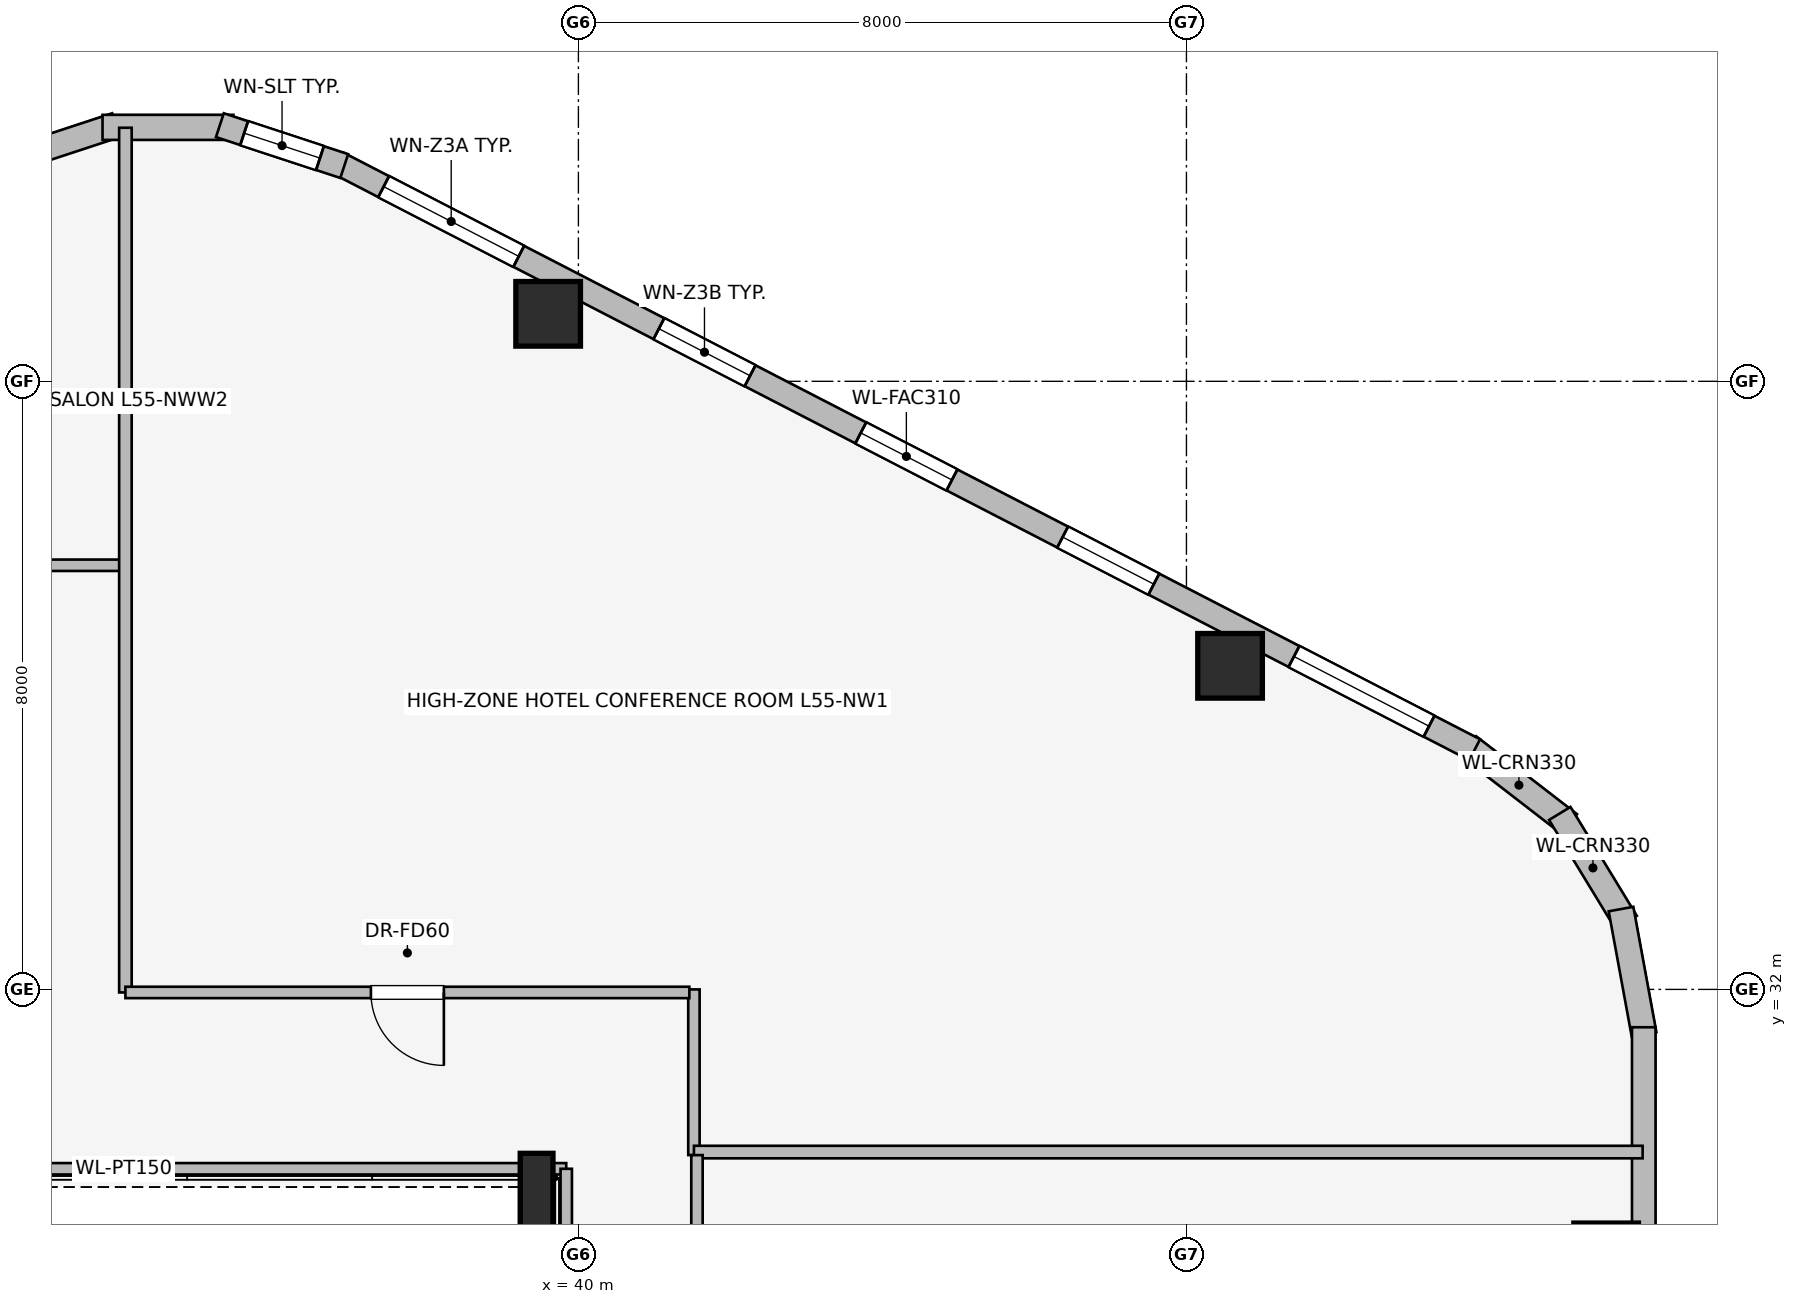
"""IFC4 building model, lengths in metres.
Left out: names, types, materials, properties, quantities, classifications, styles, units other than length and angle.
Written with IfcOpenShell. Run it as: python <this file> out.ifc"""

import sys

from ifc_helpers import new_model, si_unit, direction, frame, frame_2d, origin, origin_2d, place, context, subcontext, project, spatial, rectangle, i_section, extrude, element, fill, save


model = new_model("IFC4")
c1 = context("Model", 3, precision=1e-05, world=origin(), true_north=direction((0.0, 1.0)))
c2 = subcontext(c1, "Body", "Model", "MODEL_VIEW")
j1 = project(units=[si_unit("LENGTHUNIT", "METRE"), si_unit("PLANEANGLEUNIT", "RADIAN")], contexts=[c1])
p1 = place(None, origin())
s1 = spatial("IfcSite", under=j1, at=p1, CompositionType="ELEMENT")
p2 = place(p1, origin())
s2 = spatial("IfcBuilding", under=s1, at=p2, CompositionType="ELEMENT")
p3 = place(p2, frame((0.0, 0.0, 203.35)))
s3 = spatial("IfcBuildingStorey", under=s2, at=p3, CompositionType="ELEMENT", Elevation=203.35)
for number, where, z_axis, x_axis in (
    (1, (48.574, 36.257, 0.0), (0.0, 0.0, 1.0), (1.0, 0.0, 0.0)),
    (2, (39.602, 40.888, 0.0), (0.0, 0.0, 1.0), (1.0, 0.0, 0.0)),
    (3, (53.522, 28.501, 0.0), (0.0, 0.0, 1.0), (1.0, 0.0, 0.0)),
):
    element("IfcColumn", number, at=place(p3, frame(where, z_axis=z_axis, x_axis=x_axis)), inside=s3, PredefinedType="COLUMN", context=c2, shape_type="SweptSolid", body=[
        extrude(rectangle(XDim=0.85, YDim=0.85, at=origin_2d()), origin(), (0.0, 0.0, 1.0), 3.45),
    ])
p4 = place(p3, frame((39.45, 29.35, 0.0), z_axis=(0.0, 0.0, 1.0), x_axis=(1.0, 0.0, 0.0)))
e4 = element("IfcColumn", 4, at=p4, inside=s3, PredefinedType="COLUMN", context=c2, shape_type="SweptSolid", body=[
    extrude(i_section(OverallWidth=0.431, OverallDepth=0.987, WebThickness=0.034, FlangeThickness=0.062, at=origin_2d()), origin(), (0.0, 0.0, 1.0), 3.45),
])
p5 = place(p3, frame((51.711, 35.2, 0.0), z_axis=(0.0, 0.0, 1.0), x_axis=(0.791464279355, -0.611215423976, 0.0)))
e5 = element("IfcWall", 5, at=p5, inside=s3, PredefinedType="STANDARD", context=c2, shape_type="SweptSolid", body=[
    extrude(rectangle(XDim=1.677, YDim=0.33, at=frame_2d((0.838, 0.0))), origin(), (0.0, 0.0, 1.0), 3.19),
])
p6 = place(p3, frame((52.912, 34.315, 0.0), z_axis=(0.0, 0.0, 1.0), x_axis=(0.520219286058, -0.85403272444, 0.0)))
e6 = element("IfcWall", 6, at=p6, inside=s3, PredefinedType="STANDARD", context=c2, shape_type="SweptSolid", body=[
    extrude(rectangle(XDim=1.678, YDim=0.33, at=frame_2d((0.839, 0.0))), origin(), (0.0, 0.0, 1.0), 3.19),
])
p7 = place(p3, frame((53.718, 33.057, 0.0), z_axis=(0.0, 0.0, 1.0), x_axis=(0.180717642671, -0.983535019014, 0.0)))
e7 = element("IfcWall", 7, at=p7, inside=s3, PredefinedType="STANDARD", context=c2, shape_type="SweptSolid", body=[
    extrude(rectangle(XDim=1.677, YDim=0.33, at=frame_2d((0.838, 0.0))), origin(), (0.0, 0.0, 1.0), 3.19),
])
p8 = place(p3, frame((36.838, 42.871, 0.0), z_axis=(0.0, 0.0, 1.0), x_axis=(0.888626188278, -0.458632202867, 0.0)))
e8 = element("IfcWall", 8, at=p8, inside=s3, PredefinedType="STANDARD", context=c2, shape_type="SweptSolid", body=[
    extrude(rectangle(XDim=16.828, YDim=0.31, at=frame_2d((8.414, 0.0))), origin(), (0.0, 0.0, 1.0), 3.19),
])
p9 = place(p8, frame((0.675, 0.0, 0.75)))
e9 = element("IfcOpeningElement", 9, at=p9, cuts=e8, PredefinedType="OPENING", context=c2, shape_type="SweptSolid", body=[
    extrude(rectangle(XDim=2.0, YDim=1.5, at=frame_2d((1.0, 0.75))), frame((0.0, 0.165, 0.0), z_axis=(0.0, -1.0, 0.0), x_axis=(1.0, 0.0, 0.0)), (0.0, 0.0, 1.0), 0.33),
])
p10 = place(p8, frame((4.75, 0.0, 0.75)))
e10 = element("IfcOpeningElement", 10, at=p10, cuts=e8, PredefinedType="OPENING", context=c2, shape_type="SweptSolid", body=[
    extrude(rectangle(XDim=1.35, YDim=1.45, at=frame_2d((0.675, 0.725))), frame((0.0, 0.165, 0.0), z_axis=(0.0, -1.0, 0.0), x_axis=(1.0, 0.0, 0.0)), (0.0, 0.0, 1.0), 0.33),
])
p11 = place(p8, frame((7.739, 0.0, 0.75)))
e11 = element("IfcOpeningElement", 11, at=p11, cuts=e8, PredefinedType="OPENING", context=c2, shape_type="SweptSolid", body=[
    extrude(rectangle(XDim=1.35, YDim=1.45, at=frame_2d((0.675, 0.725))), frame((0.0, 0.165, 0.0), z_axis=(0.0, -1.0, 0.0), x_axis=(1.0, 0.0, 0.0)), (0.0, 0.0, 1.0), 0.33),
])
p12 = place(p8, frame((10.728, 0.0, 0.75)))
e12 = element("IfcOpeningElement", 12, at=p12, cuts=e8, PredefinedType="OPENING", context=c2, shape_type="SweptSolid", body=[
    extrude(rectangle(XDim=1.35, YDim=1.45, at=frame_2d((0.675, 0.725))), frame((0.0, 0.165, 0.0), z_axis=(0.0, -1.0, 0.0), x_axis=(1.0, 0.0, 0.0)), (0.0, 0.0, 1.0), 0.33),
])
p13 = place(p8, frame((14.153, 0.0, 0.75)))
e13 = element("IfcOpeningElement", 13, at=p13, cuts=e8, PredefinedType="OPENING", context=c2, shape_type="SweptSolid", body=[
    extrude(rectangle(XDim=2.0, YDim=1.5, at=frame_2d((1.0, 0.75))), frame((0.0, 0.165, 0.0), z_axis=(0.0, -1.0, 0.0), x_axis=(1.0, 0.0, 0.0)), (0.0, 0.0, 1.0), 0.33),
])
p14 = place(p3, frame((32.281, 42.832, 0.0), z_axis=(0.0, 0.0, 1.0), x_axis=(0.949937416267, 0.312440242569, 0.0)))
e14 = element("IfcWall", 14, at=p14, inside=s3, PredefinedType="STANDARD", context=c2, shape_type="SweptSolid", body=[
    extrude(rectangle(XDim=1.722, YDim=0.33, at=frame_2d((0.861, 0.0))), origin(), (0.0, 0.0, 1.0), 3.19),
])
p15 = place(p3, frame((33.739, 43.341, 0.0), z_axis=(0.0, 0.0, 1.0), x_axis=(1.0, 0.0, 0.0)))
e15 = element("IfcWall", 15, at=p15, inside=s3, PredefinedType="STANDARD", context=c2, shape_type="SweptSolid", body=[
    extrude(rectangle(XDim=1.722, YDim=0.33, at=frame_2d((0.861, 0.0))), origin(), (0.0, 0.0, 1.0), 3.19),
])
p16 = place(p3, frame((35.283, 43.37, 0.0), z_axis=(0.0, 0.0, 1.0), x_axis=(0.949937416267, -0.312440242569, 0.0)))
e16 = element("IfcWall", 16, at=p16, inside=s3, PredefinedType="STANDARD", context=c2, shape_type="SweptSolid", body=[
    extrude(rectangle(XDim=1.722, YDim=0.33, at=frame_2d((0.861, 0.0))), origin(), (0.0, 0.0, 1.0), 3.19),
])
p17 = place(p16, frame((0.336, 0.0, 0.75)))
e17 = element("IfcOpeningElement", 17, at=p17, cuts=e16, PredefinedType="OPENING", context=c2, shape_type="SweptSolid", body=[
    extrude(rectangle(XDim=1.05, YDim=1.4, at=frame_2d((0.525, 0.7))), frame((0.0, 0.175, 0.0), z_axis=(0.0, -1.0, 0.0), x_axis=(1.0, 0.0, 0.0)), (0.0, 0.0, 1.0), 0.35),
])
p18 = place(p3, frame((54.017, 31.502, 0.0), z_axis=(0.0, 0.0, 1.0), x_axis=(0.0, -1.0, 0.0)))
e18 = element("IfcWall", 18, at=p18, inside=s3, PredefinedType="STANDARD", context=c2, shape_type="SweptSolid", body=[
    extrude(rectangle(XDim=15.004, YDim=0.31, at=frame_2d((7.502, 0.0))), origin(), (0.0, 0.0, 1.0), 3.19),
])
p19 = place(p18, frame((4.007, 0.0, 0.75)))
e19 = element("IfcOpeningElement", 19, at=p19, cuts=e18, PredefinedType="OPENING", context=c2, shape_type="SweptSolid", body=[
    extrude(rectangle(XDim=1.05, YDim=1.4, at=frame_2d((0.525, 0.7))), frame((0.0, 0.165, 0.0), z_axis=(0.0, -1.0, 0.0), x_axis=(1.0, 0.0, 0.0)), (0.0, 0.0, 1.0), 0.33),
])
p20 = place(p18, frame((6.833, 0.0, 0.75)))
e20 = element("IfcOpeningElement", 20, at=p20, cuts=e18, PredefinedType="OPENING", context=c2, shape_type="SweptSolid", body=[
    extrude(rectangle(XDim=1.35, YDim=1.45, at=frame_2d((0.675, 0.725))), frame((0.0, 0.165, 0.0), z_axis=(0.0, -1.0, 0.0), x_axis=(1.0, 0.0, 0.0)), (0.0, 0.0, 1.0), 0.33),
])
p21 = place(p18, frame((9.953, 0.0, 0.75)))
e21 = element("IfcOpeningElement", 21, at=p21, cuts=e18, PredefinedType="OPENING", context=c2, shape_type="SweptSolid", body=[
    extrude(rectangle(XDim=1.05, YDim=1.4, at=frame_2d((0.525, 0.7))), frame((0.0, 0.165, 0.0), z_axis=(0.0, -1.0, 0.0), x_axis=(1.0, 0.0, 0.0)), (0.0, 0.0, 1.0), 0.33),
])
p22 = place(p3, frame((39.84, 29.64, 0.0), z_axis=(0.0, 0.0, 1.0), x_axis=(-1.0, 0.0, 0.0)))
e22 = element("IfcWall", 22, at=p22, inside=s3, PredefinedType="PARTITIONING", context=c2, shape_type="SweptSolid", body=[
    extrude(rectangle(XDim=12.203, YDim=0.15, at=frame_2d((6.102, 0.0))), origin(), (0.0, 0.0, 1.0), 2.331),
])
p23 = place(p3, frame((39.84, 18.36, 0.0), z_axis=(0.0, 0.0, 1.0), x_axis=(0.0, 1.0, 0.0)))
e23 = element("IfcWall", 23, at=p23, inside=s3, PredefinedType="PARTITIONING", context=c2, shape_type="SweptSolid", body=[
    extrude(rectangle(XDim=11.28, YDim=0.15, at=frame_2d((5.64, 0.0))), origin(), (0.0, 0.0, 1.0), 3.19),
])
p24 = place(p3, frame((33.962, 37.58, 0.0), z_axis=(0.0, 0.0, 1.0), x_axis=(-1.0, 0.0, 0.0)))
e24 = element("IfcWall", 24, at=p24, inside=s3, PredefinedType="PARTITIONING", context=c2, shape_type="SweptSolid", body=[
    extrude(rectangle(XDim=5.836, YDim=0.15, at=frame_2d((2.918, 0.0))), origin(), (0.0, 0.0, 1.0), 2.582),
])
p25 = place(p24, frame((2.663, 0.0, 0.0)))
e25 = element("IfcOpeningElement", 25, at=p25, cuts=e24, PredefinedType="OPENING", context=c2, shape_type="SweptSolid", body=[
    extrude(rectangle(XDim=0.96, YDim=2.0, at=frame_2d((0.48, 1.0))), frame((0.0, 0.085, 0.0), z_axis=(0.0, -1.0, 0.0), x_axis=(1.0, 0.0, 0.0)), (0.0, 0.0, 1.0), 0.17),
])
p26 = place(p3, frame((34.04, 31.96, 0.0), z_axis=(0.0, 0.0, 1.0), x_axis=(0.0, 1.0, 0.0)))
e26 = element("IfcWall", 26, at=p26, inside=s3, PredefinedType="PARTITIONING", context=c2, shape_type="SweptSolid", body=[
    extrude(rectangle(XDim=11.376, YDim=0.165, at=frame_2d((5.688, 0.0))), origin(), (0.0, 0.0, 1.0), 3.19),
])
p27 = place(p3, frame((41.52, 29.82, 0.0), z_axis=(0.0, 0.0, 1.0), x_axis=(0.0, 1.0, 0.0)))
e27 = element("IfcWall", 27, at=p27, inside=s3, PredefinedType="PARTITIONING", context=c2, shape_type="SweptSolid", body=[
    extrude(rectangle(XDim=2.18, YDim=0.15, at=frame_2d((1.09, 0.0))), origin(), (0.0, 0.0, 1.0), 3.19),
])
p28 = place(p3, frame((41.46, 31.96, 0.0), z_axis=(0.0, 0.0, 1.0), x_axis=(-1.0, 0.0, 0.0)))
e28 = element("IfcWall", 28, at=p28, inside=s3, PredefinedType="PARTITIONING", context=c2, shape_type="SweptSolid", body=[
    extrude(rectangle(XDim=7.42, YDim=0.15, at=frame_2d((3.71, 0.0))), origin(), (0.0, 0.0, 1.0), 3.19),
])
p29 = place(p28, frame((3.23, 0.0, 0.0)))
e29 = element("IfcOpeningElement", 29, at=p29, cuts=e28, PredefinedType="OPENING", context=c2, shape_type="SweptSolid", body=[
    extrude(rectangle(XDim=0.96, YDim=2.0, at=frame_2d((0.48, 1.0))), frame((0.0, 0.085, 0.0), z_axis=(0.0, -1.0, 0.0), x_axis=(1.0, 0.0, 0.0)), (0.0, 0.0, 1.0), 0.17),
])
p30 = place(p3, frame((41.52, 29.86, 0.0), z_axis=(0.0, 0.0, 1.0), x_axis=(1.0, 0.0, 0.0)))
e30 = element("IfcWall", 30, at=p30, inside=s3, PredefinedType="PARTITIONING", context=c2, shape_type="SweptSolid", body=[
    extrude(rectangle(XDim=12.482, YDim=0.165, at=frame_2d((6.241, 0.0))), origin(), (0.0, 0.0, 1.0), 3.19),
])
p31 = place(p3, frame((41.56, 25.659, 0.0), z_axis=(0.0, 0.0, 1.0), x_axis=(0.0, 1.0, 0.0)))
e31 = element("IfcWall", 31, at=p31, inside=s3, PredefinedType="PARTITIONING", context=c2, shape_type="SweptSolid", body=[
    extrude(rectangle(XDim=4.161, YDim=0.15, at=frame_2d((2.081, 0.0))), origin(), (0.0, 0.0, 1.0), 3.19),
])
p32 = place(p31, frame((1.601, 0.0, 0.0)))
e32 = element("IfcOpeningElement", 32, at=p32, cuts=e31, PredefinedType="OPENING", context=c2, shape_type="SweptSolid", body=[
    extrude(rectangle(XDim=0.96, YDim=2.0, at=frame_2d((0.48, 1.0))), frame((0.0, 0.085, 0.0), z_axis=(0.0, -1.0, 0.0), x_axis=(1.0, 0.0, 0.0)), (0.0, 0.0, 1.0), 0.17),
])
p33 = place(p9, origin())
e33 = element("IfcWindow", 33, at=p33, inside=s3, PartitioningType="SINGLE_PANEL", PredefinedType="WINDOW", context=c2, shape_type="SweptSolid", body=[
    extrude(rectangle(XDim=2.0, YDim=1.5, at=frame_2d((1.0, 0.75))), frame((0.0, 0.03, 0.0), z_axis=(0.0, -1.0, 0.0), x_axis=(1.0, 0.0, 0.0)), (0.0, 0.0, 1.0), 0.06),
])
fill(e9, e33)
p34 = place(p10, origin())
e34 = element("IfcWindow", 34, at=p34, inside=s3, PartitioningType="SINGLE_PANEL", PredefinedType="WINDOW", context=c2, shape_type="SweptSolid", body=[
    extrude(rectangle(XDim=1.35, YDim=1.45, at=frame_2d((0.675, 0.725))), frame((0.0, 0.03, 0.0), z_axis=(0.0, -1.0, 0.0), x_axis=(1.0, 0.0, 0.0)), (0.0, 0.0, 1.0), 0.06),
])
fill(e10, e34)
p35 = place(p11, origin())
e35 = element("IfcWindow", 35, at=p35, inside=s3, PartitioningType="SINGLE_PANEL", PredefinedType="WINDOW", context=c2, shape_type="SweptSolid", body=[
    extrude(rectangle(XDim=1.35, YDim=1.45, at=frame_2d((0.675, 0.725))), frame((0.0, 0.03, 0.0), z_axis=(0.0, -1.0, 0.0), x_axis=(1.0, 0.0, 0.0)), (0.0, 0.0, 1.0), 0.06),
])
fill(e11, e35)
p36 = place(p12, origin())
e36 = element("IfcWindow", 36, at=p36, inside=s3, PartitioningType="SINGLE_PANEL", PredefinedType="WINDOW", context=c2, shape_type="SweptSolid", body=[
    extrude(rectangle(XDim=1.35, YDim=1.45, at=frame_2d((0.675, 0.725))), frame((0.0, 0.03, 0.0), z_axis=(0.0, -1.0, 0.0), x_axis=(1.0, 0.0, 0.0)), (0.0, 0.0, 1.0), 0.06),
])
fill(e12, e36)
p37 = place(p13, origin())
e37 = element("IfcWindow", 37, at=p37, inside=s3, PartitioningType="SINGLE_PANEL", PredefinedType="WINDOW", context=c2, shape_type="SweptSolid", body=[
    extrude(rectangle(XDim=2.0, YDim=1.5, at=frame_2d((1.0, 0.75))), frame((0.0, 0.03, 0.0), z_axis=(0.0, -1.0, 0.0), x_axis=(1.0, 0.0, 0.0)), (0.0, 0.0, 1.0), 0.06),
])
fill(e13, e37)
p38 = place(p17, origin())
e38 = element("IfcWindow", 38, at=p38, inside=s3, PartitioningType="SINGLE_PANEL", PredefinedType="WINDOW", context=c2, shape_type="SweptSolid", body=[
    extrude(rectangle(XDim=1.05, YDim=1.4, at=frame_2d((0.525, 0.7))), frame((0.0, 0.03, 0.0), z_axis=(0.0, -1.0, 0.0), x_axis=(1.0, 0.0, 0.0)), (0.0, 0.0, 1.0), 0.06),
])
fill(e17, e38)
p39 = place(p29, origin())
e39 = element("IfcDoor", 39, at=p39, inside=s3, OperationType="SINGLE_SWING_LEFT", PredefinedType="DOOR", context=c2, shape_type="SweptSolid", body=[
    extrude(rectangle(XDim=0.96, YDim=2.0, at=frame_2d((0.48, 1.0))), frame((0.0, 0.025, 0.0), z_axis=(0.0, -1.0, 0.0), x_axis=(1.0, 0.0, 0.0)), (0.0, 0.0, 1.0), 0.05),
])
fill(e29, e39)
save(model, sys.argv[1])
